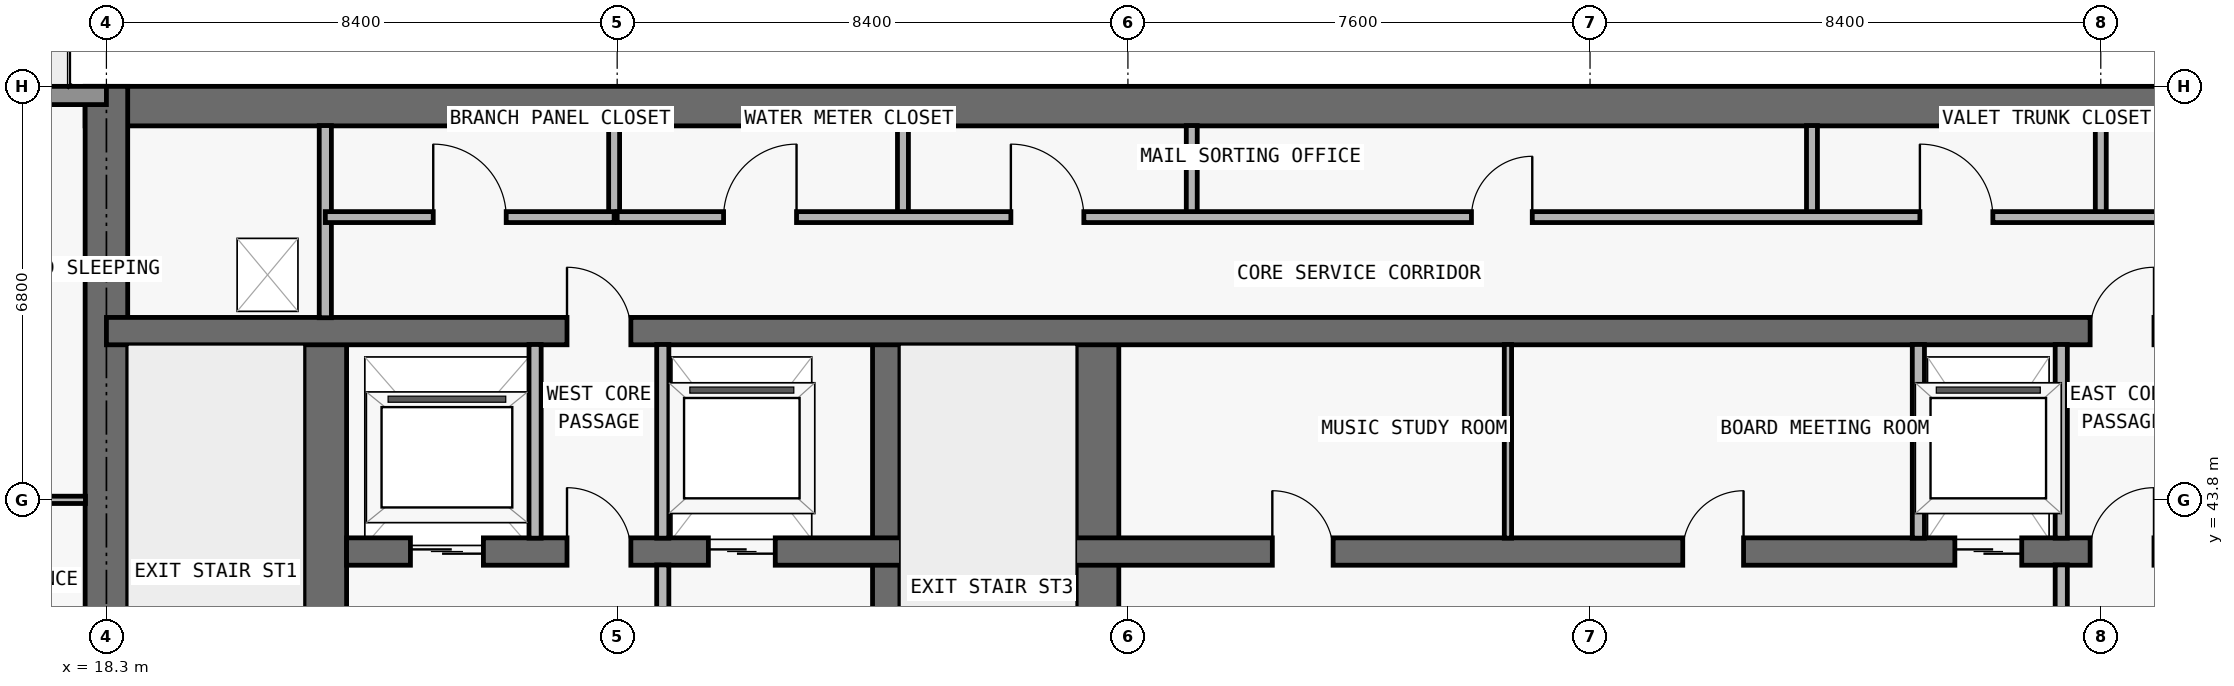
"""IFC4 building model, lengths in metres.
Left out: names, types, materials, properties, quantities, classifications, styles, units other than length and angle.
Written with IfcOpenShell. Run it as: python <this file> out.ifc"""

import sys

from ifc_helpers import new_model, si_unit, direction, frame, frame_2d, origin, place, context, subcontext, project, spatial, rectangle, extrude, element, fill, save


model = new_model("IFC4")
c1 = context("Model", 3, precision=1e-05, world=origin(), true_north=direction((0.0, 1.0)))
c2 = subcontext(c1, "Body", "Model", "MODEL_VIEW")
j1 = project(units=[si_unit("LENGTHUNIT", "METRE"), si_unit("PLANEANGLEUNIT", "RADIAN")], contexts=[c1])
p1 = place(None, origin())
s1 = spatial("IfcSite", under=j1, at=p1, CompositionType="ELEMENT")
p2 = place(p1, origin())
s2 = spatial("IfcBuilding", under=s1, at=p2, CompositionType="ELEMENT")
p3 = place(p2, frame((0.0, 0.0, 208.2)))
s3 = spatial("IfcBuildingStorey", under=s2, at=p3, CompositionType="ELEMENT", Elevation=208.2)
p4 = place(p3, frame((17.95, 50.275, 0.0), z_axis=(0.0, 0.0, 1.0), x_axis=(1.0, 0.0, 0.0)))
e1 = element("IfcWall", 1, at=p4, inside=s3, PredefinedType="SHEAR", context=c2, shape_type="SweptSolid", body=[
    extrude(rectangle(XDim=41.9, YDim=0.65, at=frame_2d((20.95, 0.0))), origin(), (0.0, 0.0, 1.0), 3.05),
])
p5 = place(p3, frame((18.3, 36.65, 0.0), z_axis=(0.0, 0.0, 1.0), x_axis=(0.0, 1.0, 0.0)))
e2 = element("IfcWall", 2, at=p5, inside=s3, PredefinedType="SHEAR", context=c2, shape_type="SweptSolid", body=[
    extrude(rectangle(XDim=13.95, YDim=0.7, at=frame_2d((6.975, 0.0))), origin(), (0.0, 0.0, 1.0), 3.05),
])
p6 = place(p3, frame((21.9, 37.0, 0.0), z_axis=(0.0, 0.0, 1.0), x_axis=(0.0, 1.0, 0.0)))
e3 = element("IfcWall", 3, at=p6, inside=s3, PredefinedType="SHEAR", context=c2, shape_type="SweptSolid", body=[
    extrude(rectangle(XDim=9.575, YDim=0.7, at=frame_2d((4.788, 0.0))), origin(), (0.0, 0.0, 1.0), 3.05),
])
p7 = place(p6, frame((0.55, 0.0, 0.0)))
e4 = element("IfcOpeningElement", 4, at=p7, cuts=e3, PredefinedType="OPENING", context=c2, shape_type="SweptSolid", body=[
    extrude(rectangle(XDim=1.1, YDim=2.15, at=frame_2d((0.55, 1.075))), frame((0.0, 0.36, 0.0), z_axis=(0.0, -1.0, 0.0), x_axis=(1.0, 0.0, 0.0)), (0.0, 0.0, 1.0), 0.72),
])
p8 = place(p3, frame((31.125, 37.0, 0.0), z_axis=(0.0, 0.0, 1.0), x_axis=(0.0, 1.0, 0.0)))
e5 = element("IfcWall", 5, at=p8, inside=s3, PredefinedType="SHEAR", context=c2, shape_type="SweptSolid", body=[
    extrude(rectangle(XDim=9.575, YDim=0.45, at=frame_2d((4.788, 0.0))), origin(), (0.0, 0.0, 1.0), 3.05),
])
p9 = place(p3, frame((34.6, 37.0, 0.0), z_axis=(0.0, 0.0, 1.0), x_axis=(0.0, 1.0, 0.0)))
e6 = element("IfcWall", 6, at=p9, inside=s3, PredefinedType="SHEAR", context=c2, shape_type="SweptSolid", body=[
    extrude(rectangle(XDim=9.575, YDim=0.7, at=frame_2d((4.788, 0.0))), origin(), (0.0, 0.0, 1.0), 3.05),
])
p10 = place(p3, frame((22.25, 42.95, 0.0), z_axis=(0.0, 0.0, 1.0), x_axis=(1.0, 0.0, 0.0)))
e7 = element("IfcWall", 7, at=p10, inside=s3, PredefinedType="SHEAR", context=c2, shape_type="SweptSolid", body=[
    extrude(rectangle(XDim=33.3, YDim=0.45, at=frame_2d((16.65, 0.0))), origin(), (0.0, 0.0, 1.0), 3.05),
])
p11 = place(p10, frame((1.05, 0.0, 0.0)))
e8 = element("IfcOpeningElement", 8, at=p11, cuts=e7, PredefinedType="OPENING", context=c2, shape_type="SweptSolid", body=[
    extrude(rectangle(XDim=1.2, YDim=2.2, at=frame_2d((0.6, 1.1))), frame((0.0, 0.235, 0.0), z_axis=(0.0, -1.0, 0.0), x_axis=(1.0, 0.0, 0.0)), (0.0, 0.0, 1.0), 0.47),
])
p12 = place(p10, frame((31.05, 0.0, 0.0)))
e9 = element("IfcOpeningElement", 9, at=p12, cuts=e7, PredefinedType="OPENING", context=c2, shape_type="SweptSolid", body=[
    extrude(rectangle(XDim=1.2, YDim=2.2, at=frame_2d((0.6, 1.1))), frame((0.0, 0.235, 0.0), z_axis=(0.0, -1.0, 0.0), x_axis=(1.0, 0.0, 0.0)), (0.0, 0.0, 1.0), 0.47),
])
p13 = place(p10, frame((26.45, 0.0, 0.0)))
e10 = element("IfcOpeningElement", 10, at=p13, cuts=e7, PredefinedType="OPENING", context=c2, shape_type="SweptSolid", body=[
    extrude(rectangle(XDim=1.1, YDim=2.2, at=frame_2d((0.55, 1.1))), frame((0.0, 0.235, 0.0), z_axis=(0.0, -1.0, 0.0), x_axis=(1.0, 0.0, 0.0)), (0.0, 0.0, 1.0), 0.47),
])
p14 = place(p10, frame((5.95, 0.0, 0.0)))
e11 = element("IfcOpeningElement", 11, at=p14, cuts=e7, PredefinedType="OPENING", context=c2, shape_type="SweptSolid", body=[
    extrude(rectangle(XDim=1.1, YDim=2.2, at=frame_2d((0.55, 1.1))), frame((0.0, 0.235, 0.0), z_axis=(0.0, -1.0, 0.0), x_axis=(1.0, 0.0, 0.0)), (0.0, 0.0, 1.0), 0.47),
])
p15 = place(p10, frame((3.625, 0.0, 0.0)))
e12 = element("IfcOpeningElement", 12, at=p15, cuts=e7, PredefinedType="OPENING", context=c2, shape_type="SweptSolid", body=[
    extrude(rectangle(XDim=1.05, YDim=2.15, at=frame_2d((0.525, 1.075))), frame((0.0, 0.235, 0.0), z_axis=(0.0, -1.0, 0.0), x_axis=(1.0, 0.0, 0.0)), (0.0, 0.0, 1.0), 0.47),
])
p16 = place(p10, frame((28.675, 0.0, 0.0)))
e13 = element("IfcOpeningElement", 13, at=p16, cuts=e7, PredefinedType="OPENING", context=c2, shape_type="SweptSolid", body=[
    extrude(rectangle(XDim=1.05, YDim=2.15, at=frame_2d((0.525, 1.075))), frame((0.0, 0.235, 0.0), z_axis=(0.0, -1.0, 0.0), x_axis=(1.0, 0.0, 0.0)), (0.0, 0.0, 1.0), 0.47),
])
p17 = place(p10, frame((15.225, 0.0, 0.0)))
e14 = element("IfcOpeningElement", 14, at=p17, cuts=e7, PredefinedType="OPENING", context=c2, shape_type="SweptSolid", body=[
    extrude(rectangle(XDim=1.0, YDim=2.2, at=frame_2d((0.5, 1.1))), frame((0.0, 0.235, 0.0), z_axis=(0.0, -1.0, 0.0), x_axis=(1.0, 0.0, 0.0)), (0.0, 0.0, 1.0), 0.47),
])
p18 = place(p10, frame((21.975, 0.0, 0.0)))
e15 = element("IfcOpeningElement", 15, at=p18, cuts=e7, PredefinedType="OPENING", context=c2, shape_type="SweptSolid", body=[
    extrude(rectangle(XDim=1.0, YDim=2.2, at=frame_2d((0.5, 1.1))), frame((0.0, 0.235, 0.0), z_axis=(0.0, -1.0, 0.0), x_axis=(1.0, 0.0, 0.0)), (0.0, 0.0, 1.0), 0.47),
])
p19 = place(p3, frame((18.3, 46.575, 0.0), z_axis=(0.0, 0.0, 1.0), x_axis=(1.0, 0.0, 0.0)))
e16 = element("IfcWall", 16, at=p19, inside=s3, PredefinedType="SHEAR", context=c2, shape_type="SweptSolid", body=[
    extrude(rectangle(XDim=41.2, YDim=0.45, at=frame_2d((20.6, 0.0))), origin(), (0.0, 0.0, 1.0), 3.05),
])
p20 = place(p19, frame((7.575, 0.0, 0.0)))
e17 = element("IfcOpeningElement", 17, at=p20, cuts=e16, PredefinedType="OPENING", context=c2, shape_type="SweptSolid", body=[
    extrude(rectangle(XDim=1.05, YDim=2.15, at=frame_2d((0.525, 1.075))), frame((0.0, 0.235, 0.0), z_axis=(0.0, -1.0, 0.0), x_axis=(1.0, 0.0, 0.0)), (0.0, 0.0, 1.0), 0.47),
])
p21 = place(p19, frame((32.625, 0.0, 0.0)))
e18 = element("IfcOpeningElement", 18, at=p21, cuts=e16, PredefinedType="OPENING", context=c2, shape_type="SweptSolid", body=[
    extrude(rectangle(XDim=1.05, YDim=2.15, at=frame_2d((0.525, 1.075))), frame((0.0, 0.235, 0.0), z_axis=(0.0, -1.0, 0.0), x_axis=(1.0, 0.0, 0.0)), (0.0, 0.0, 1.0), 0.47),
])
p22 = place(p3, frame((10.1, 50.45, 0.0), z_axis=(0.0, 0.0, 1.0), x_axis=(1.0, 0.0, 0.0)))
e19 = element("IfcWall", 19, at=p22, inside=s3, PredefinedType="STANDARD", context=c2, shape_type="SweptSolid", body=[
    extrude(rectangle(XDim=8.2, YDim=0.3, at=frame_2d((4.1, 0.0))), origin(), (0.0, 0.0, 1.0), 3.05),
])
p23 = place(p22, frame((3.1, 0.0, 0.0)))
e20 = element("IfcOpeningElement", 20, at=p23, cuts=e19, PredefinedType="OPENING", context=c2, shape_type="SweptSolid", body=[
    extrude(rectangle(XDim=2.0, YDim=2.3, at=frame_2d((1.0, 1.15))), frame((0.0, 0.16, 0.0), z_axis=(0.0, -1.0, 0.0), x_axis=(1.0, 0.0, 0.0)), (0.0, 0.0, 1.0), 0.32),
])
p24 = place(p3, frame((21.9, 46.795, 0.0), z_axis=(0.0, 0.0, 1.0), x_axis=(0.0, 1.0, 0.0)))
e21 = element("IfcWall", 21, at=p24, inside=s3, PredefinedType="PARTITIONING", context=c2, shape_type="SweptSolid", body=[
    extrude(rectangle(XDim=3.16, YDim=0.2, at=frame_2d((1.58, 0.0))), origin(), (0.0, 0.0, 1.0), 3.05),
])
p25 = place(p3, frame((25.35, 43.17, 0.0), z_axis=(0.0, 0.0, 1.0), x_axis=(0.0, 1.0, 0.0)))
e22 = element("IfcWall", 22, at=p25, inside=s3, PredefinedType="PARTITIONING", context=c2, shape_type="SweptSolid", body=[
    extrude(rectangle(XDim=3.185, YDim=0.2, at=frame_2d((1.593, 0.0))), origin(), (0.0, 0.0, 1.0), 3.05),
])
p26 = place(p3, frame((26.65, 48.45, 0.0), z_axis=(0.0, 0.0, 1.0), x_axis=(0.0, 1.0, 0.0)))
e23 = element("IfcWall", 23, at=p26, inside=s3, PredefinedType="PARTITIONING", context=c2, shape_type="SweptSolid", body=[
    extrude(rectangle(XDim=1.505, YDim=0.18, at=frame_2d((0.752, 0.0))), origin(), (0.0, 0.0, 1.0), 3.05),
])
p27 = place(p3, frame((27.45, 37.345, 0.0), z_axis=(0.0, 0.0, 1.0), x_axis=(0.0, 1.0, 0.0)))
e24 = element("IfcWall", 24, at=p27, inside=s3, PredefinedType="PARTITIONING", context=c2, shape_type="SweptSolid", body=[
    extrude(rectangle(XDim=5.385, YDim=0.2, at=frame_2d((2.692, 0.0))), origin(), (0.0, 0.0, 1.0), 3.05),
])
p28 = place(p3, frame((27.45, 43.17, 0.0), z_axis=(0.0, 0.0, 1.0), x_axis=(0.0, 1.0, 0.0)))
e25 = element("IfcWall", 25, at=p28, inside=s3, PredefinedType="PARTITIONING", context=c2, shape_type="SweptSolid", body=[
    extrude(rectangle(XDim=3.185, YDim=0.2, at=frame_2d((1.593, 0.0))), origin(), (0.0, 0.0, 1.0), 3.05),
])
for number, where, z_axis, x_axis in (
    (26, (31.4, 48.45, 0.0), (0.0, 0.0, 1.0), (0.0, 1.0, 0.0)),
    (27, (36.15, 48.45, 0.0), (0.0, 0.0, 1.0), (0.0, 1.0, 0.0)),
):
    element("IfcWall", number, at=place(p3, frame(where, z_axis=z_axis, x_axis=x_axis)), inside=s3, PredefinedType="PARTITIONING", context=c2, shape_type="SweptSolid", body=[
        extrude(rectangle(XDim=1.505, YDim=0.18, at=frame_2d((0.752, 0.0))), origin(), (0.0, 0.0, 1.0), 3.05),
    ])
p29 = place(p3, frame((41.35, 43.17, 0.0), z_axis=(0.0, 0.0, 1.0), x_axis=(0.0, 1.0, 0.0)))
e28 = element("IfcWall", 28, at=p29, inside=s3, PredefinedType="PARTITIONING", context=c2, shape_type="SweptSolid", body=[
    extrude(rectangle(XDim=3.185, YDim=0.12, at=frame_2d((1.593, 0.0))), origin(), (0.0, 0.0, 1.0), 3.05),
])
p30 = place(p3, frame((46.35, 48.45, 0.0), z_axis=(0.0, 0.0, 1.0), x_axis=(0.0, 1.0, 0.0)))
e29 = element("IfcWall", 29, at=p30, inside=s3, PredefinedType="PARTITIONING", context=c2, shape_type="SweptSolid", body=[
    extrude(rectangle(XDim=1.505, YDim=0.18, at=frame_2d((0.752, 0.0))), origin(), (0.0, 0.0, 1.0), 3.05),
])
p31 = place(p3, frame((48.1, 43.17, 0.0), z_axis=(0.0, 0.0, 1.0), x_axis=(0.0, 1.0, 0.0)))
e30 = element("IfcWall", 30, at=p31, inside=s3, PredefinedType="PARTITIONING", context=c2, shape_type="SweptSolid", body=[
    extrude(rectangle(XDim=3.185, YDim=0.2, at=frame_2d((1.593, 0.0))), origin(), (0.0, 0.0, 1.0), 3.05),
])
p32 = place(p3, frame((50.45, 37.345, 0.0), z_axis=(0.0, 0.0, 1.0), x_axis=(0.0, 1.0, 0.0)))
e31 = element("IfcWall", 31, at=p32, inside=s3, PredefinedType="PARTITIONING", context=c2, shape_type="SweptSolid", body=[
    extrude(rectangle(XDim=5.385, YDim=0.2, at=frame_2d((2.692, 0.0))), origin(), (0.0, 0.0, 1.0), 3.05),
])
p33 = place(p3, frame((50.45, 43.17, 0.0), z_axis=(0.0, 0.0, 1.0), x_axis=(0.0, 1.0, 0.0)))
e32 = element("IfcWall", 32, at=p33, inside=s3, PredefinedType="PARTITIONING", context=c2, shape_type="SweptSolid", body=[
    extrude(rectangle(XDim=3.185, YDim=0.2, at=frame_2d((1.593, 0.0))), origin(), (0.0, 0.0, 1.0), 3.05),
])
p34 = place(p3, frame((51.1, 48.45, 0.0), z_axis=(0.0, 0.0, 1.0), x_axis=(0.0, 1.0, 0.0)))
e33 = element("IfcWall", 33, at=p34, inside=s3, PredefinedType="PARTITIONING", context=c2, shape_type="SweptSolid", body=[
    extrude(rectangle(XDim=1.505, YDim=0.18, at=frame_2d((0.752, 0.0))), origin(), (0.0, 0.0, 1.0), 3.05),
])
p35 = place(p3, frame((6.395, 43.8, 0.0), z_axis=(0.0, 0.0, 1.0), x_axis=(1.0, 0.0, 0.0)))
e34 = element("IfcWall", 34, at=p35, inside=s3, PredefinedType="PARTITIONING", context=c2, shape_type="SweptSolid", body=[
    extrude(rectangle(XDim=11.56, YDim=0.12, at=frame_2d((5.78, 0.0))), origin(), (0.0, 0.0, 1.0), 2.418),
])
p36 = place(p35, frame((7.251, 0.0, 0.0)))
e35 = element("IfcOpeningElement", 35, at=p36, cuts=e34, PredefinedType="OPENING", context=c2, shape_type="SweptSolid", body=[
    extrude(rectangle(XDim=0.9, YDim=2.15, at=frame_2d((0.45, 1.075))), frame((0.0, 0.07, 0.0), z_axis=(0.0, -1.0, 0.0), x_axis=(1.0, 0.0, 0.0)), (0.0, 0.0, 1.0), 0.14),
])
p37 = place(p35, frame((9.982, 0.0, 0.0)))
e36 = element("IfcOpeningElement", 36, at=p37, cuts=e34, PredefinedType="OPENING", context=c2, shape_type="SweptSolid", body=[
    extrude(rectangle(XDim=0.85, YDim=2.1, at=frame_2d((0.425, 1.05))), frame((0.0, 0.07, 0.0), z_axis=(0.0, -1.0, 0.0), x_axis=(1.0, 0.0, 0.0)), (0.0, 0.0, 1.0), 0.14),
])
p38 = place(p3, frame((21.9, 48.45, 0.0), z_axis=(0.0, 0.0, 1.0), x_axis=(1.0, 0.0, 0.0)))
e37 = element("IfcWall", 37, at=p38, inside=s3, PredefinedType="PARTITIONING", context=c2, shape_type="SweptSolid", body=[
    extrude(rectangle(XDim=4.75, YDim=0.18, at=frame_2d((2.375, 0.0))), origin(), (0.0, 0.0, 1.0), 3.05),
])
p39 = place(p38, frame((1.775, 0.0, 0.0)))
e38 = element("IfcOpeningElement", 38, at=p39, cuts=e37, PredefinedType="OPENING", context=c2, shape_type="SweptSolid", body=[
    extrude(rectangle(XDim=1.2, YDim=2.2, at=frame_2d((0.6, 1.1))), frame((0.0, 0.1, 0.0), z_axis=(0.0, -1.0, 0.0), x_axis=(1.0, 0.0, 0.0)), (0.0, 0.0, 1.0), 0.2),
])
p40 = place(p3, frame((26.7, 48.45, 0.0), z_axis=(0.0, 0.0, 1.0), x_axis=(1.0, 0.0, 0.0)))
e39 = element("IfcWall", 39, at=p40, inside=s3, PredefinedType="PARTITIONING", context=c2, shape_type="SweptSolid", body=[
    extrude(rectangle(XDim=29.2, YDim=0.18, at=frame_2d((14.6, 0.0))), origin(), (0.0, 0.0, 1.0), 3.05),
])
p41 = place(p40, frame((1.75, 0.0, 0.0)))
e40 = element("IfcOpeningElement", 40, at=p41, cuts=e39, PredefinedType="OPENING", context=c2, shape_type="SweptSolid", body=[
    extrude(rectangle(XDim=1.2, YDim=2.2, at=frame_2d((0.6, 1.1))), frame((0.0, 0.1, 0.0), z_axis=(0.0, -1.0, 0.0), x_axis=(1.0, 0.0, 0.0)), (0.0, 0.0, 1.0), 0.2),
])
p42 = place(p40, frame((6.475, 0.0, 0.0)))
e41 = element("IfcOpeningElement", 41, at=p42, cuts=e39, PredefinedType="OPENING", context=c2, shape_type="SweptSolid", body=[
    extrude(rectangle(XDim=1.2, YDim=2.2, at=frame_2d((0.6, 1.1))), frame((0.0, 0.1, 0.0), z_axis=(0.0, -1.0, 0.0), x_axis=(1.0, 0.0, 0.0)), (0.0, 0.0, 1.0), 0.2),
])
p43 = place(p40, frame((14.05, 0.0, 0.0)))
e42 = element("IfcOpeningElement", 42, at=p43, cuts=e39, PredefinedType="OPENING", context=c2, shape_type="SweptSolid", body=[
    extrude(rectangle(XDim=1.0, YDim=2.2, at=frame_2d((0.5, 1.1))), frame((0.0, 0.1, 0.0), z_axis=(0.0, -1.0, 0.0), x_axis=(1.0, 0.0, 0.0)), (0.0, 0.0, 1.0), 0.2),
])
p44 = place(p40, frame((21.425, 0.0, 0.0)))
e43 = element("IfcOpeningElement", 43, at=p44, cuts=e39, PredefinedType="OPENING", context=c2, shape_type="SweptSolid", body=[
    extrude(rectangle(XDim=1.2, YDim=2.2, at=frame_2d((0.6, 1.1))), frame((0.0, 0.1, 0.0), z_axis=(0.0, -1.0, 0.0), x_axis=(1.0, 0.0, 0.0)), (0.0, 0.0, 1.0), 0.2),
])
p45 = place(p40, frame((26.375, 0.0, 0.0)))
e44 = element("IfcOpeningElement", 44, at=p45, cuts=e39, PredefinedType="OPENING", context=c2, shape_type="SweptSolid", body=[
    extrude(rectangle(XDim=0.85, YDim=2.1, at=frame_2d((0.425, 1.05))), frame((0.0, 0.1, 0.0), z_axis=(0.0, -1.0, 0.0), x_axis=(1.0, 0.0, 0.0)), (0.0, 0.0, 1.0), 0.2),
])
p46 = place(p11, origin())
e45 = element("IfcDoor", 45, at=p46, inside=s3, OperationType="DOUBLE_DOOR_SLIDING", PredefinedType="DOOR", context=c2, shape_type="SweptSolid", body=[
    extrude(rectangle(XDim=1.2, YDim=2.2, at=frame_2d((0.6, 1.1))), frame((0.0, 0.025, 0.0), z_axis=(0.0, -1.0, 0.0), x_axis=(1.0, 0.0, 0.0)), (0.0, 0.0, 1.0), 0.05),
])
fill(e8, e45)
p47 = place(p13, origin())
e46 = element("IfcDoor", 46, at=p47, inside=s3, OperationType="DOUBLE_DOOR_SLIDING", PredefinedType="DOOR", context=c2, shape_type="SweptSolid", body=[
    extrude(rectangle(XDim=1.1, YDim=2.2, at=frame_2d((0.55, 1.1))), frame((0.0, 0.025, 0.0), z_axis=(0.0, -1.0, 0.0), x_axis=(1.0, 0.0, 0.0)), (0.0, 0.0, 1.0), 0.05),
])
fill(e10, e46)
p48 = place(p14, origin())
e47 = element("IfcDoor", 47, at=p48, inside=s3, OperationType="DOUBLE_DOOR_SLIDING", PredefinedType="DOOR", context=c2, shape_type="SweptSolid", body=[
    extrude(rectangle(XDim=1.1, YDim=2.2, at=frame_2d((0.55, 1.1))), frame((0.0, 0.025, 0.0), z_axis=(0.0, -1.0, 0.0), x_axis=(1.0, 0.0, 0.0)), (0.0, 0.0, 1.0), 0.05),
])
fill(e11, e47)
p49 = place(p15, origin())
e48 = element("IfcDoor", 48, at=p49, inside=s3, OperationType="SINGLE_SWING_LEFT", PredefinedType="DOOR", context=c2, shape_type="SweptSolid", body=[
    extrude(rectangle(XDim=1.05, YDim=2.15, at=frame_2d((0.525, 1.075))), frame((0.0, 0.025, 0.0), z_axis=(0.0, -1.0, 0.0), x_axis=(1.0, 0.0, 0.0)), (0.0, 0.0, 1.0), 0.05),
])
fill(e12, e48)
p50 = place(p16, origin())
e49 = element("IfcDoor", 49, at=p50, inside=s3, OperationType="SINGLE_SWING_RIGHT", PredefinedType="DOOR", context=c2, shape_type="SweptSolid", body=[
    extrude(rectangle(XDim=1.05, YDim=2.15, at=frame_2d((0.525, 1.075))), frame((0.0, 0.025, 0.0), z_axis=(0.0, -1.0, 0.0), x_axis=(1.0, 0.0, 0.0)), (0.0, 0.0, 1.0), 0.05),
])
fill(e13, e49)
p51 = place(p17, origin())
e50 = element("IfcDoor", 50, at=p51, inside=s3, OperationType="SINGLE_SWING_LEFT", PredefinedType="DOOR", context=c2, shape_type="SweptSolid", body=[
    extrude(rectangle(XDim=1.0, YDim=2.2, at=frame_2d((0.5, 1.1))), frame((0.0, 0.025, 0.0), z_axis=(0.0, -1.0, 0.0), x_axis=(1.0, 0.0, 0.0)), (0.0, 0.0, 1.0), 0.05),
])
fill(e14, e50)
p52 = place(p18, origin())
e51 = element("IfcDoor", 51, at=p52, inside=s3, OperationType="SINGLE_SWING_RIGHT", PredefinedType="DOOR", context=c2, shape_type="SweptSolid", body=[
    extrude(rectangle(XDim=1.0, YDim=2.2, at=frame_2d((0.5, 1.1))), frame((0.0, 0.025, 0.0), z_axis=(0.0, -1.0, 0.0), x_axis=(1.0, 0.0, 0.0)), (0.0, 0.0, 1.0), 0.05),
])
fill(e15, e51)
p53 = place(p20, origin())
e52 = element("IfcDoor", 52, at=p53, inside=s3, OperationType="SINGLE_SWING_LEFT", PredefinedType="DOOR", context=c2, shape_type="SweptSolid", body=[
    extrude(rectangle(XDim=1.05, YDim=2.15, at=frame_2d((0.525, 1.075))), frame((0.0, 0.025, 0.0), z_axis=(0.0, -1.0, 0.0), x_axis=(1.0, 0.0, 0.0)), (0.0, 0.0, 1.0), 0.05),
])
fill(e17, e52)
p54 = place(p21, origin())
e53 = element("IfcDoor", 53, at=p54, inside=s3, OperationType="SINGLE_SWING_RIGHT", PredefinedType="DOOR", context=c2, shape_type="SweptSolid", body=[
    extrude(rectangle(XDim=1.05, YDim=2.15, at=frame_2d((0.525, 1.075))), frame((0.0, 0.025, 0.0), z_axis=(0.0, -1.0, 0.0), x_axis=(1.0, 0.0, 0.0)), (0.0, 0.0, 1.0), 0.05),
])
fill(e18, e53)
p55 = place(p39, origin())
e54 = element("IfcDoor", 54, at=p55, inside=s3, OperationType="SINGLE_SWING_LEFT", PredefinedType="DOOR", context=c2, shape_type="SweptSolid", body=[
    extrude(rectangle(XDim=1.2, YDim=2.2, at=frame_2d((0.6, 1.1))), frame((0.0, 0.025, 0.0), z_axis=(0.0, -1.0, 0.0), x_axis=(1.0, 0.0, 0.0)), (0.0, 0.0, 1.0), 0.05),
])
fill(e38, e54)
p56 = place(p41, origin())
e55 = element("IfcDoor", 55, at=p56, inside=s3, OperationType="SINGLE_SWING_RIGHT", PredefinedType="DOOR", context=c2, shape_type="SweptSolid", body=[
    extrude(rectangle(XDim=1.2, YDim=2.2, at=frame_2d((0.6, 1.1))), frame((0.0, 0.025, 0.0), z_axis=(0.0, -1.0, 0.0), x_axis=(1.0, 0.0, 0.0)), (0.0, 0.0, 1.0), 0.05),
])
fill(e40, e55)
p57 = place(p42, origin())
e56 = element("IfcDoor", 56, at=p57, inside=s3, OperationType="SINGLE_SWING_LEFT", PredefinedType="DOOR", context=c2, shape_type="SweptSolid", body=[
    extrude(rectangle(XDim=1.2, YDim=2.2, at=frame_2d((0.6, 1.1))), frame((0.0, 0.025, 0.0), z_axis=(0.0, -1.0, 0.0), x_axis=(1.0, 0.0, 0.0)), (0.0, 0.0, 1.0), 0.05),
])
fill(e41, e56)
p58 = place(p43, origin())
e57 = element("IfcDoor", 57, at=p58, inside=s3, OperationType="SINGLE_SWING_RIGHT", PredefinedType="DOOR", context=c2, shape_type="SweptSolid", body=[
    extrude(rectangle(XDim=1.0, YDim=2.2, at=frame_2d((0.5, 1.1))), frame((0.0, 0.025, 0.0), z_axis=(0.0, -1.0, 0.0), x_axis=(1.0, 0.0, 0.0)), (0.0, 0.0, 1.0), 0.05),
])
fill(e42, e57)
p59 = place(p44, origin())
e58 = element("IfcDoor", 58, at=p59, inside=s3, OperationType="SINGLE_SWING_LEFT", PredefinedType="DOOR", context=c2, shape_type="SweptSolid", body=[
    extrude(rectangle(XDim=1.2, YDim=2.2, at=frame_2d((0.6, 1.1))), frame((0.0, 0.025, 0.0), z_axis=(0.0, -1.0, 0.0), x_axis=(1.0, 0.0, 0.0)), (0.0, 0.0, 1.0), 0.05),
])
fill(e43, e58)
save(model, sys.argv[1])
